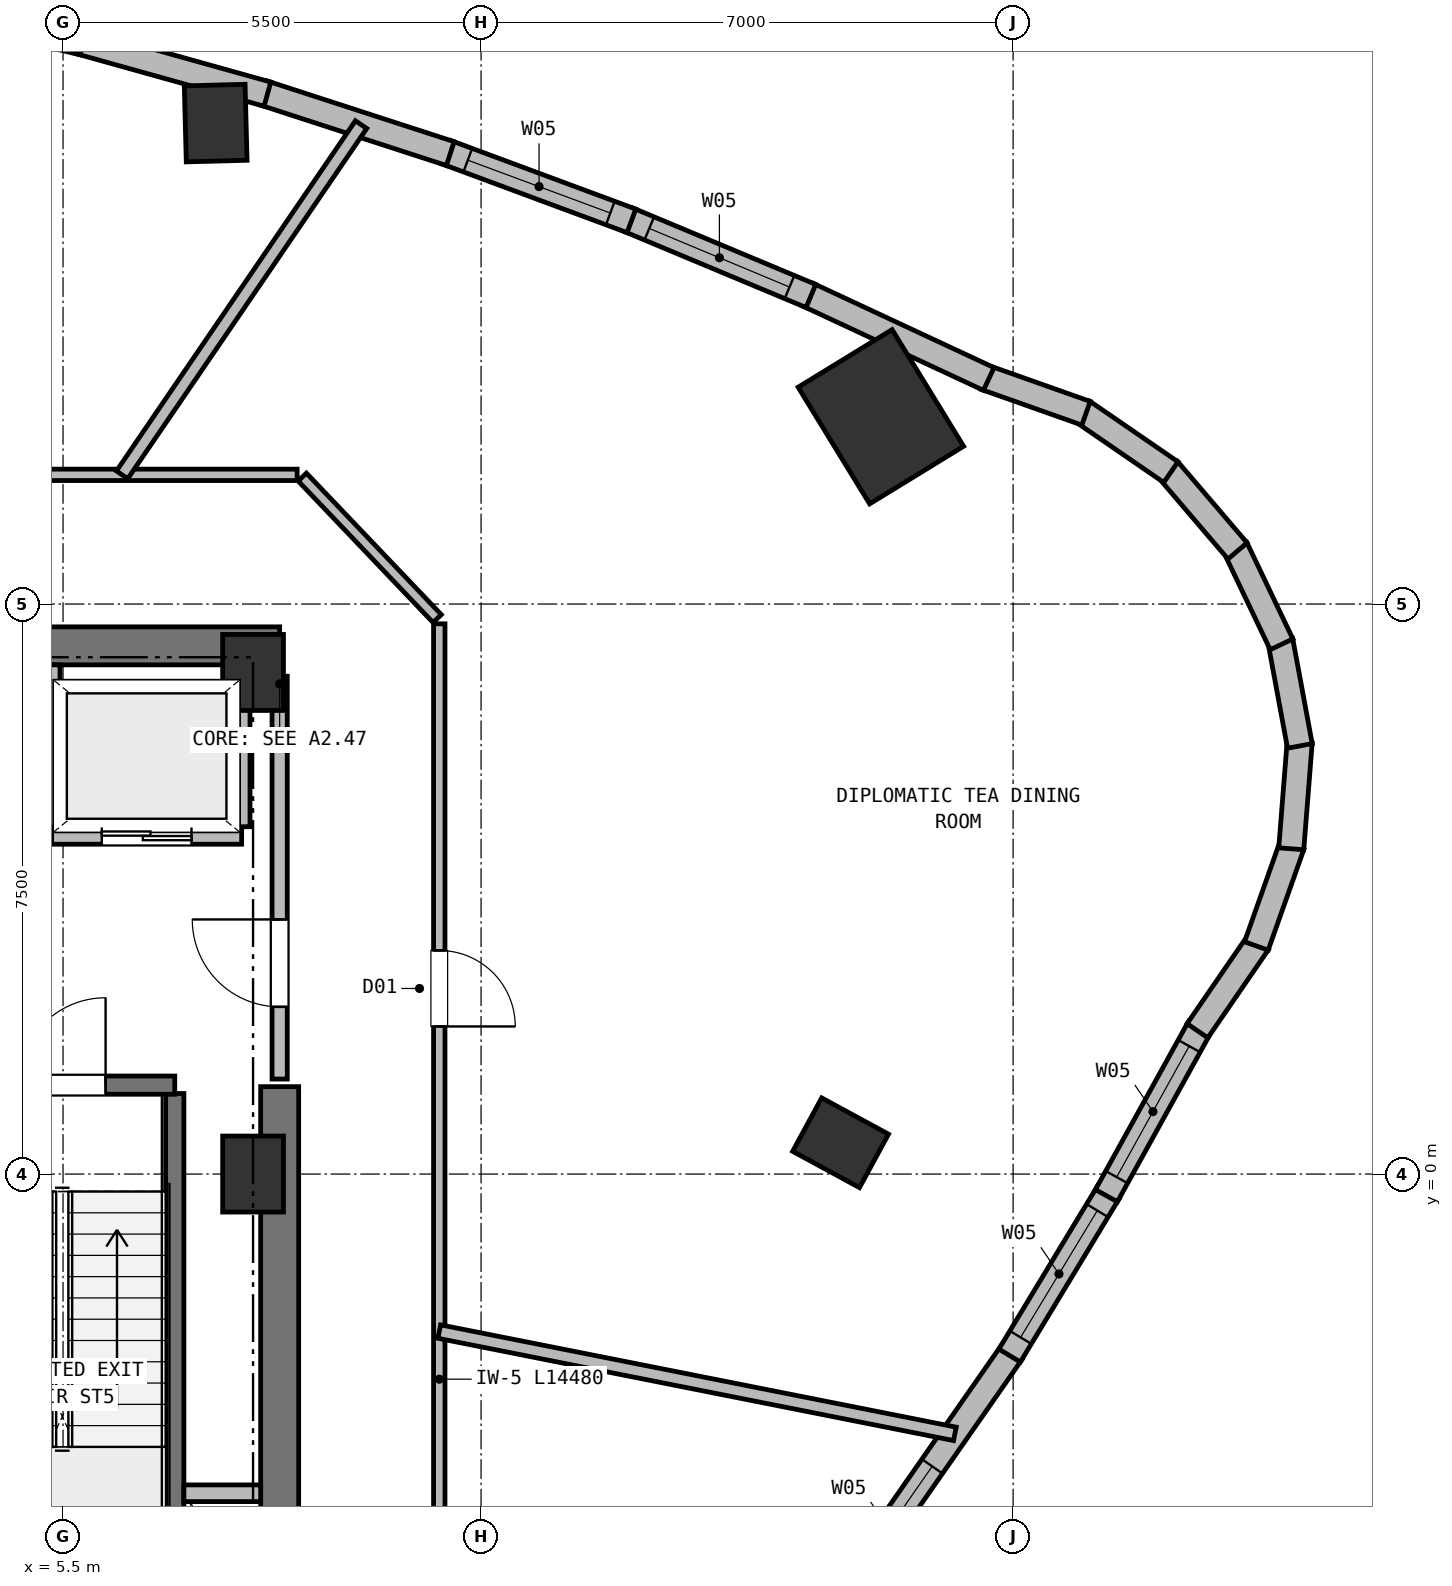
"""IFC4 building model, lengths in metres.
Left out: names, types, materials, properties, quantities, classifications, styles, units other than length and angle.
Written with IfcOpenShell. Run it as: python <this file> out.ifc"""

import sys

from ifc_helpers import new_model, si_unit, direction, frame, frame_2d, origin, origin_2d, place, context, subcontext, project, spatial, rectangle, extrude, element, fill, save


model = new_model("IFC4")
c1 = context("Model", 3, precision=1e-05, world=origin(), true_north=direction((0.0, 1.0)))
c2 = subcontext(c1, "Body", "Model", "MODEL_VIEW")
j1 = project(units=[si_unit("LENGTHUNIT", "METRE"), si_unit("PLANEANGLEUNIT", "RADIAN")], contexts=[c1])
p1 = place(None, origin())
s1 = spatial("IfcSite", under=j1, at=p1, CompositionType="ELEMENT")
p2 = place(p1, origin())
s2 = spatial("IfcBuilding", under=s1, at=p2, CompositionType="ELEMENT")
p3 = place(p2, frame((0.0, 0.0, 173.75)))
s3 = spatial("IfcBuildingStorey", under=s2, at=p3, CompositionType="ELEMENT", Elevation=173.75)
for number, where, z_axis, x_axis in (
    (1, (8.0, 0.0, 0.0), (0.0, 0.0, 1.0), (1.0, 0.0, 0.0)),
    (2, (8.0, 6.6, 0.0), (0.0, 0.0, 1.0), (1.0, 0.0, 0.0)),
):
    element("IfcColumn", number, at=place(p3, frame(where, z_axis=z_axis, x_axis=x_axis)), inside=s3, PredefinedType="COLUMN", context=c2, shape_type="SweptSolid", body=[
        extrude(rectangle(XDim=0.8, YDim=1.0, at=origin_2d()), origin(), (0.0, 0.0, 1.0), 4.5),
    ])
p4 = place(p3, frame((-8.35, 6.95, 0.0), z_axis=(0.0, 0.0, 1.0), x_axis=(1.0, 0.0, 0.0)))
e3 = element("IfcWall", 3, at=p4, inside=s3, PredefinedType="SHEAR", context=c2, shape_type="SweptSolid", body=[
    extrude(rectangle(XDim=16.7, YDim=0.5, at=frame_2d((8.35, 0.0))), origin(), (0.0, 0.0, 1.0), 4.21),
])
p5 = place(p3, frame((8.35, -6.95, 0.0), z_axis=(0.0, 0.0, 1.0), x_axis=(0.0, 1.0, 0.0)))
e4 = element("IfcWall", 4, at=p5, inside=s3, PredefinedType="SHEAR", context=c2, shape_type="SweptSolid", body=[
    extrude(rectangle(XDim=8.1, YDim=0.5, at=frame_2d((4.05, 0.0))), origin(), (0.0, 0.0, 1.0), 4.21),
])
p6 = place(p3, frame((15.73, 0.412, 0.0), z_axis=(0.0, 0.0, 1.0), x_axis=(0.47715876026, 0.878817112662, 0.0)))
e5 = element("IfcColumn", 5, at=p6, inside=s3, PredefinedType="COLUMN", context=c2, shape_type="SweptSolid", body=[
    extrude(rectangle(XDim=0.8, YDim=1.0, at=origin_2d()), origin(), (0.0, 0.0, 1.0), 4.5),
])
p7 = place(p3, frame((16.26, 9.964, 0.0), z_axis=(0.0, 0.0, 1.0), x_axis=(0.852640164354, 0.522498564716, 0.0)))
e6 = element("IfcColumn", 6, at=p7, inside=s3, PredefinedType="COLUMN", context=c2, shape_type="SweptSolid", body=[
    extrude(rectangle(XDim=1.45, YDim=1.8, at=origin_2d()), origin(), (0.0, 0.0, 1.0), 4.5),
])
p8 = place(p3, frame((7.508, 13.828, 0.0), z_axis=(0.0, 0.0, 1.0), x_axis=(0.999657324976, 0.026176948308, 0.0)))
e7 = element("IfcColumn", 7, at=p8, inside=s3, PredefinedType="COLUMN", context=c2, shape_type="SweptSolid", body=[
    extrude(rectangle(XDim=0.8, YDim=1.0, at=origin_2d()), origin(), (0.0, 0.0, 1.0), 4.5),
])
p9 = place(p3, frame((17.981, -2.346, 0.0), z_axis=(0.0, 0.0, 1.0), x_axis=(-0.571969587154, -0.820274826733, 0.0)))
e8 = element("IfcWall", 8, at=p9, inside=s3, PredefinedType="SOLIDWALL", context=c2, shape_type="SweptSolid", body=[
    extrude(rectangle(XDim=5.656, YDim=0.33, at=frame_2d((2.828, 0.0))), origin(), (0.0, 0.0, 1.0), 4.21),
])
p10 = place(p9, frame((1.828, 0.0, 0.72)))
e9 = element("IfcOpeningElement", 9, at=p10, cuts=e8, PredefinedType="OPENING", context=c2, shape_type="SweptSolid", body=[
    extrude(rectangle(XDim=2.0, YDim=2.15, at=frame_2d((1.0, 1.075))), frame((0.0, 0.175, 0.0), z_axis=(0.0, -1.0, 0.0), x_axis=(1.0, 0.0, 0.0)), (0.0, 0.0, 1.0), 0.35),
])
p11 = place(p3, frame((19.252, -0.241, 0.0), z_axis=(0.0, 0.0, 1.0), x_axis=(-0.517483977519, -0.855692896436, 0.0)))
e10 = element("IfcWall", 10, at=p11, inside=s3, PredefinedType="SOLIDWALL", context=c2, shape_type="SweptSolid", body=[
    extrude(rectangle(XDim=2.509, YDim=0.33, at=frame_2d((1.254, 0.0))), origin(), (0.0, 0.0, 1.0), 4.21),
])
p12 = place(p11, frame((0.279, 0.0, 0.72)))
e11 = element("IfcOpeningElement", 11, at=p12, cuts=e10, PredefinedType="OPENING", context=c2, shape_type="SweptSolid", body=[
    extrude(rectangle(XDim=1.95, YDim=2.15, at=frame_2d((0.975, 1.075))), frame((0.0, 0.175, 0.0), z_axis=(0.0, -1.0, 0.0), x_axis=(1.0, 0.0, 0.0)), (0.0, 0.0, 1.0), 0.35),
])
p13 = place(p3, frame((20.452, 1.928, 0.0), z_axis=(0.0, 0.0, 1.0), x_axis=(-0.484166759881, -0.874975741736, 0.0)))
e12 = element("IfcWall", 12, at=p13, inside=s3, PredefinedType="SOLIDWALL", context=c2, shape_type="SweptSolid", body=[
    extrude(rectangle(XDim=2.529, YDim=0.33, at=frame_2d((1.264, 0.0))), origin(), (0.0, 0.0, 1.0), 4.21),
])
p14 = place(p13, frame((0.28, 0.0, 0.72)))
e13 = element("IfcOpeningElement", 13, at=p14, cuts=e12, PredefinedType="OPENING", context=c2, shape_type="SweptSolid", body=[
    extrude(rectangle(XDim=1.97, YDim=2.15, at=frame_2d((0.985, 1.075))), frame((0.0, 0.175, 0.0), z_axis=(0.0, -1.0, 0.0), x_axis=(1.0, 0.0, 0.0)), (0.0, 0.0, 1.0), 0.35),
])
p15 = place(p3, frame((21.223, 3.045, 0.0), z_axis=(0.0, 0.0, 1.0), x_axis=(-0.566492015675, -0.824067227947, 0.0)))
e14 = element("IfcWall", 14, at=p15, inside=s3, PredefinedType="SOLIDWALL", context=c2, shape_type="SweptSolid", body=[
    extrude(rectangle(XDim=1.407, YDim=0.33, at=frame_2d((0.704, 0.0))), origin(), (0.0, 0.0, 1.0), 4.21),
])
p16 = place(p3, frame((21.67, 4.328, 0.0), z_axis=(0.0, 0.0, 1.0), x_axis=(-0.333709077945, -0.942676111555, 0.0)))
e15 = element("IfcWall", 15, at=p16, inside=s3, PredefinedType="SOLIDWALL", context=c2, shape_type="SweptSolid", body=[
    extrude(rectangle(XDim=1.408, YDim=0.33, at=frame_2d((0.704, 0.0))), origin(), (0.0, 0.0, 1.0), 4.21),
])
for number, where, z_axis, x_axis in (
    (16, (21.77, 5.683, 0.0), (0.0, 0.0, 1.0), (-0.079, -0.997, 0.0)),
    (17, (21.516, 7.017, 0.0), (0.0, 0.0, 1.0), (0.182, -0.983, 0.0)),
):
    element("IfcWall", number, at=place(p3, frame(where, z_axis=z_axis, x_axis=x_axis)), inside=s3, PredefinedType="SOLIDWALL", context=c2, shape_type="SweptSolid", body=[
        extrude(rectangle(XDim=1.407, YDim=0.33, at=frame_2d((0.704, 0.0))), origin(), (0.0, 0.0, 1.0), 4.21),
    ])
p17 = place(p3, frame((20.926, 8.24, 0.0), z_axis=(0.0, 0.0, 1.0), x_axis=(0.43048556818, -0.902597460438, 0.0)))
e18 = element("IfcWall", 18, at=p17, inside=s3, PredefinedType="SOLIDWALL", context=c2, shape_type="SweptSolid", body=[
    extrude(rectangle(XDim=1.408, YDim=0.33, at=frame_2d((0.704, 0.0))), origin(), (0.0, 0.0, 1.0), 4.21),
])
p18 = place(p3, frame((20.039, 9.269, 0.0), z_axis=(0.0, 0.0, 1.0), x_axis=(0.64941898982, -0.760430782952, 0.0)))
e19 = element("IfcWall", 19, at=p18, inside=s3, PredefinedType="SOLIDWALL", context=c2, shape_type="SweptSolid", body=[
    extrude(rectangle(XDim=1.407, YDim=0.33, at=frame_2d((0.704, 0.0))), origin(), (0.0, 0.0, 1.0), 4.21),
])
for number, where, z_axis, x_axis in (
    (20, (18.915, 10.033, 0.0), (0.0, 0.0, 1.0), (0.824, -0.566, 0.0)),
    (21, (17.633, 10.48, 0.0), (0.0, 0.0, 1.0), (0.943, -0.334, 0.0)),
):
    element("IfcWall", number, at=place(p3, frame(where, z_axis=z_axis, x_axis=x_axis)), inside=s3, PredefinedType="SOLIDWALL", context=c2, shape_type="SweptSolid", body=[
        extrude(rectangle(XDim=1.408, YDim=0.33, at=frame_2d((0.704, 0.0))), origin(), (0.0, 0.0, 1.0), 4.21),
    ])
p19 = place(p3, frame((15.294, 11.573, 0.0), z_axis=(0.0, 0.0, 1.0), x_axis=(0.906353689665, -0.422519809275, 0.0)))
e22 = element("IfcWall", 22, at=p19, inside=s3, PredefinedType="SOLIDWALL", context=c2, shape_type="SweptSolid", body=[
    extrude(rectangle(XDim=2.632, YDim=0.33, at=frame_2d((1.316, 0.0))), origin(), (0.0, 0.0, 1.0), 4.21),
])
p20 = place(p3, frame((12.932, 12.56, 0.0), z_axis=(0.0, 0.0, 1.0), x_axis=(0.922597431626, -0.385764149653, 0.0)))
e23 = element("IfcWall", 23, at=p20, inside=s3, PredefinedType="SOLIDWALL", context=c2, shape_type="SweptSolid", body=[
    extrude(rectangle(XDim=2.61, YDim=0.33, at=frame_2d((1.305, 0.0))), origin(), (0.0, 0.0, 1.0), 4.21),
])
p21 = place(p20, frame((0.305, 0.0, 0.72)))
e24 = element("IfcOpeningElement", 24, at=p21, cuts=e23, PredefinedType="OPENING", context=c2, shape_type="SweptSolid", body=[
    extrude(rectangle(XDim=2.0, YDim=2.15, at=frame_2d((1.0, 1.075))), frame((0.0, 0.175, 0.0), z_axis=(0.0, -1.0, 0.0), x_axis=(1.0, 0.0, 0.0)), (0.0, 0.0, 1.0), 0.35),
])
p22 = place(p3, frame((10.548, 13.444, 0.0), z_axis=(0.0, 0.0, 1.0), x_axis=(0.937535008849, -0.347890941506, 0.0)))
e25 = element("IfcWall", 25, at=p22, inside=s3, PredefinedType="SOLIDWALL", context=c2, shape_type="SweptSolid", body=[
    extrude(rectangle(XDim=2.592, YDim=0.33, at=frame_2d((1.296, 0.0))), origin(), (0.0, 0.0, 1.0), 4.21),
])
p23 = place(p22, frame((0.296, 0.0, 0.72)))
e26 = element("IfcOpeningElement", 26, at=p23, cuts=e25, PredefinedType="OPENING", context=c2, shape_type="SweptSolid", body=[
    extrude(rectangle(XDim=2.0, YDim=2.15, at=frame_2d((1.0, 1.075))), frame((0.0, 0.175, 0.0), z_axis=(0.0, -1.0, 0.0), x_axis=(1.0, 0.0, 0.0)), (0.0, 0.0, 1.0), 0.35),
])
p24 = place(p3, frame((8.141, 14.224, 0.0), z_axis=(0.0, 0.0, 1.0), x_axis=(0.951143213295, -0.308750040976, 0.0)))
e27 = element("IfcWall", 27, at=p24, inside=s3, PredefinedType="SOLIDWALL", context=c2, shape_type="SweptSolid", body=[
    extrude(rectangle(XDim=2.579, YDim=0.33, at=frame_2d((1.29, 0.0))), origin(), (0.0, 0.0, 1.0), 4.21),
])
p25 = place(p3, frame((5.713, 14.901, 0.0), z_axis=(0.0, 0.0, 1.0), x_axis=(0.963148250091, -0.268971092028, 0.0)))
e28 = element("IfcWall", 28, at=p25, inside=s3, PredefinedType="SOLIDWALL", context=c2, shape_type="SweptSolid", body=[
    extrude(rectangle(XDim=2.571, YDim=0.33, at=frame_2d((1.285, 0.0))), origin(), (0.0, 0.0, 1.0), 4.21),
])
p26 = place(p3, frame((3.264, 15.474, 0.0), z_axis=(0.0, 0.0, 1.0), x_axis=(0.973560466093, -0.228429461457, 0.0)))
e29 = element("IfcWall", 29, at=p26, inside=s3, PredefinedType="SOLIDWALL", context=c2, shape_type="SweptSolid", body=[
    extrude(rectangle(XDim=2.566, YDim=0.33, at=frame_2d((1.283, 0.0))), origin(), (0.0, 0.0, 1.0), 4.21),
])
p27 = place(p26, frame((0.283, 0.0, 0.72)))
e30 = element("IfcOpeningElement", 30, at=p27, cuts=e29, PredefinedType="OPENING", context=c2, shape_type="SweptSolid", body=[
    extrude(rectangle(XDim=2.0, YDim=2.15, at=frame_2d((1.0, 1.075))), frame((0.0, 0.175, 0.0), z_axis=(0.0, -1.0, 0.0), x_axis=(1.0, 0.0, 0.0)), (0.0, 0.0, 1.0), 0.35),
])
p28 = place(p3, frame((6.97, -6.16, 0.0), z_axis=(0.0, 0.0, 1.0), x_axis=(0.0, 1.0, 0.0)))
e31 = element("IfcWall", 31, at=p28, inside=s3, PredefinedType="SHEAR", context=c2, shape_type="SweptSolid", body=[
    extrude(rectangle(XDim=7.22, YDim=0.24, at=frame_2d((3.61, 0.0))), origin(), (0.0, 0.0, 1.0), 4.21),
])
p29 = place(p3, frame((4.01, 1.17, 0.0), z_axis=(0.0, 0.0, 1.0), x_axis=(1.0, 0.0, 0.0)))
e32 = element("IfcWall", 32, at=p29, inside=s3, PredefinedType="SHEAR", context=c2, shape_type="SweptSolid", body=[
    extrude(rectangle(XDim=2.96, YDim=0.24, at=frame_2d((1.48, 0.0))), origin(), (0.0, 0.0, 1.0), 4.21),
])
p30 = place(p29, frame((0.9, 0.0, 0.0)))
e33 = element("IfcOpeningElement", 33, at=p30, cuts=e32, PredefinedType="OPENING", context=c2, shape_type="SweptSolid", body=[
    extrude(rectangle(XDim=1.15, YDim=2.15, at=frame_2d((0.575, 1.075))), frame((0.0, 0.13, 0.0), z_axis=(0.0, -1.0, 0.0), x_axis=(1.0, 0.0, 0.0)), (0.0, 0.0, 1.0), 0.26),
])
p31 = place(p3, frame((7.09, -4.2, 0.0), z_axis=(0.0, 0.0, 1.0), x_axis=(1.0, 0.0, 0.0)))
e34 = element("IfcWall", 34, at=p31, inside=s3, PredefinedType="PARTITIONING", context=c2, shape_type="SweptSolid", body=[
    extrude(rectangle(XDim=1.01, YDim=0.22, at=frame_2d((0.505, 0.0))), origin(), (0.0, 0.0, 1.0), 4.21),
])
p32 = place(p3, frame((5.35, 4.45, 0.0), z_axis=(0.0, 0.0, 1.0), x_axis=(1.0, 0.0, 0.0)))
e35 = element("IfcWall", 35, at=p32, inside=s3, PredefinedType="PARTITIONING", context=c2, shape_type="SweptSolid", body=[
    extrude(rectangle(XDim=2.5, YDim=0.22, at=frame_2d((1.25, 0.0))), origin(), (0.0, 0.0, 1.0), 4.21),
])
p33 = place(p32, frame((0.66, 0.0, 0.0)))
e36 = element("IfcOpeningElement", 36, at=p33, cuts=e35, PredefinedType="OPENING", context=c2, shape_type="SweptSolid", body=[
    extrude(rectangle(XDim=1.18, YDim=2.15, at=frame_2d((0.59, 1.075))), frame((0.0, 0.12, 0.0), z_axis=(0.0, -1.0, 0.0), x_axis=(1.0, 0.0, 0.0)), (0.0, 0.0, 1.0), 0.24),
])
p34 = place(p3, frame((5.35, 4.57, 0.0), z_axis=(0.0, 0.0, 1.0), x_axis=(0.0, 1.0, 0.0)))
e37 = element("IfcWall", 37, at=p34, inside=s3, PredefinedType="PARTITIONING", context=c2, shape_type="SweptSolid", body=[
    extrude(rectangle(XDim=2.13, YDim=0.22, at=frame_2d((1.065, 0.0))), origin(), (0.0, 0.0, 1.0), 4.21),
])
p35 = place(p3, frame((7.85, 4.57, 0.0), z_axis=(0.0, 0.0, 1.0), x_axis=(0.0, 1.0, 0.0)))
e38 = element("IfcWall", 38, at=p35, inside=s3, PredefinedType="PARTITIONING", context=c2, shape_type="SweptSolid", body=[
    extrude(rectangle(XDim=2.13, YDim=0.22, at=frame_2d((1.065, 0.0))), origin(), (0.0, 0.0, 1.0), 3.84),
])
p36 = place(p3, frame((8.35, 1.25, 0.0), z_axis=(0.0, 0.0, 1.0), x_axis=(0.0, 1.0, 0.0)))
e39 = element("IfcWall", 39, at=p36, inside=s3, PredefinedType="PARTITIONING", context=c2, shape_type="SweptSolid", body=[
    extrude(rectangle(XDim=5.3, YDim=0.2, at=frame_2d((2.65, 0.0))), origin(), (0.0, 0.0, 1.0), 4.21),
])
p37 = place(p36, frame((0.95, 0.0, 0.0)))
e40 = element("IfcOpeningElement", 40, at=p37, cuts=e39, PredefinedType="OPENING", context=c2, shape_type="SweptSolid", body=[
    extrude(rectangle(XDim=1.15, YDim=2.15, at=frame_2d((0.575, 1.075))), frame((0.0, 0.11, 0.0), z_axis=(0.0, -1.0, 0.0), x_axis=(1.0, 0.0, 0.0)), (0.0, 0.0, 1.0), 0.22),
])
p38 = place(p3, frame((10.45, 7.24, 0.0), z_axis=(0.0, 0.0, 1.0), x_axis=(0.0, -1.0, 0.0)))
e41 = element("IfcWall", 41, at=p38, inside=s3, PredefinedType="PARTITIONING", context=c2, shape_type="SweptSolid", body=[
    extrude(rectangle(XDim=14.48, YDim=0.15, at=frame_2d((7.24, 0.0))), origin(), (0.0, 0.0, 1.0), 4.21),
])
p39 = place(p38, frame((4.298, 0.0, 0.0)))
e42 = element("IfcOpeningElement", 42, at=p39, cuts=e41, PredefinedType="OPENING", context=c2, shape_type="SweptSolid", body=[
    extrude(rectangle(XDim=1.0, YDim=2.15, at=frame_2d((0.5, 1.075))), frame((0.0, 0.085, 0.0), z_axis=(0.0, -1.0, 0.0), x_axis=(1.0, 0.0, 0.0)), (0.0, 0.0, 1.0), 0.17),
])
p40 = place(p3, frame((8.648, 9.171, 0.0), z_axis=(0.0, 0.0, 1.0), x_axis=(0.689960858356, -0.723846678473, 0.0)))
e43 = element("IfcWall", 43, at=p40, inside=s3, PredefinedType="PARTITIONING", context=c2, shape_type="SweptSolid", body=[
    extrude(rectangle(XDim=2.572, YDim=0.15, at=frame_2d((1.286, 0.0))), origin(), (0.0, 0.0, 1.0), 4.21),
])
p41 = place(p3, frame((-8.58, 9.2, 0.0), z_axis=(0.0, 0.0, 1.0), x_axis=(1.0, 0.0, 0.0)))
e44 = element("IfcWall", 44, at=p41, inside=s3, PredefinedType="PARTITIONING", context=c2, shape_type="SweptSolid", body=[
    extrude(rectangle(XDim=17.16, YDim=0.15, at=frame_2d((8.58, 0.0))), origin(), (0.0, 0.0, 1.0), 4.21),
])
p42 = place(p41, frame((8.625, 0.0, 0.0)))
e45 = element("IfcOpeningElement", 45, at=p42, cuts=e44, PredefinedType="OPENING", context=c2, shape_type="SweptSolid", body=[
    extrude(rectangle(XDim=1.0, YDim=2.15, at=frame_2d((0.5, 1.075))), frame((0.0, 0.085, 0.0), z_axis=(0.0, -1.0, 0.0), x_axis=(1.0, 0.0, 0.0)), (0.0, 0.0, 1.0), 0.17),
])
p43 = place(p3, frame((10.45, -2.073, 0.0), z_axis=(0.0, 0.0, 1.0), x_axis=(0.980886326551, -0.194581639385, 0.0)))
e46 = element("IfcWall", 46, at=p43, inside=s3, PredefinedType="PARTITIONING", context=c2, shape_type="SweptSolid", body=[
    extrude(rectangle(XDim=6.916, YDim=0.18, at=frame_2d((3.458, 0.0))), origin(), (0.0, 0.0, 1.0), 4.21),
])
p44 = place(p3, frame((6.277, 9.2, 0.0), z_axis=(0.0, 0.0, 1.0), x_axis=(0.563596172667, 0.826050454969, 0.0)))
e47 = element("IfcWall", 47, at=p44, inside=s3, PredefinedType="PARTITIONING", context=c2, shape_type="SweptSolid", body=[
    extrude(rectangle(XDim=5.579, YDim=0.18, at=frame_2d((2.789, 0.0))), origin(), (0.0, 0.0, 1.0), 4.21),
])
p45 = place(p10, origin())
e48 = element("IfcWindow", 48, at=p45, inside=s3, PartitioningType="SINGLE_PANEL", PredefinedType="WINDOW", context=c2, shape_type="SweptSolid", body=[
    extrude(rectangle(XDim=2.0, YDim=2.15, at=frame_2d((1.0, 1.075))), frame((0.0, 0.03, 0.0), z_axis=(0.0, -1.0, 0.0), x_axis=(1.0, 0.0, 0.0)), (0.0, 0.0, 1.0), 0.06),
])
fill(e9, e48)
p46 = place(p12, origin())
e49 = element("IfcWindow", 49, at=p46, inside=s3, PartitioningType="SINGLE_PANEL", PredefinedType="WINDOW", context=c2, shape_type="SweptSolid", body=[
    extrude(rectangle(XDim=1.95, YDim=2.15, at=frame_2d((0.975, 1.075))), frame((0.0, 0.03, 0.0), z_axis=(0.0, -1.0, 0.0), x_axis=(1.0, 0.0, 0.0)), (0.0, 0.0, 1.0), 0.06),
])
fill(e11, e49)
p47 = place(p14, origin())
e50 = element("IfcWindow", 50, at=p47, inside=s3, PartitioningType="SINGLE_PANEL", PredefinedType="WINDOW", context=c2, shape_type="SweptSolid", body=[
    extrude(rectangle(XDim=1.97, YDim=2.15, at=frame_2d((0.985, 1.075))), frame((0.0, 0.03, 0.0), z_axis=(0.0, -1.0, 0.0), x_axis=(1.0, 0.0, 0.0)), (0.0, 0.0, 1.0), 0.06),
])
fill(e13, e50)
p48 = place(p21, origin())
e51 = element("IfcWindow", 51, at=p48, inside=s3, PartitioningType="SINGLE_PANEL", PredefinedType="WINDOW", context=c2, shape_type="SweptSolid", body=[
    extrude(rectangle(XDim=2.0, YDim=2.15, at=frame_2d((1.0, 1.075))), frame((0.0, 0.03, 0.0), z_axis=(0.0, -1.0, 0.0), x_axis=(1.0, 0.0, 0.0)), (0.0, 0.0, 1.0), 0.06),
])
fill(e24, e51)
p49 = place(p23, origin())
e52 = element("IfcWindow", 52, at=p49, inside=s3, PartitioningType="SINGLE_PANEL", PredefinedType="WINDOW", context=c2, shape_type="SweptSolid", body=[
    extrude(rectangle(XDim=2.0, YDim=2.15, at=frame_2d((1.0, 1.075))), frame((0.0, 0.03, 0.0), z_axis=(0.0, -1.0, 0.0), x_axis=(1.0, 0.0, 0.0)), (0.0, 0.0, 1.0), 0.06),
])
fill(e26, e52)
p50 = place(p30, origin())
e53 = element("IfcDoor", 53, at=p50, inside=s3, OperationType="SINGLE_SWING_RIGHT", PredefinedType="DOOR", context=c2, shape_type="SweptSolid", body=[
    extrude(rectangle(XDim=1.15, YDim=2.15, at=frame_2d((0.575, 1.075))), frame((0.0, 0.025, 0.0), z_axis=(0.0, -1.0, 0.0), x_axis=(1.0, 0.0, 0.0)), (0.0, 0.0, 1.0), 0.05),
])
fill(e33, e53)
p51 = place(p33, origin())
e54 = element("IfcDoor", 54, at=p51, inside=s3, OperationType="DOUBLE_DOOR_SLIDING", PredefinedType="DOOR", context=c2, shape_type="SweptSolid", body=[
    extrude(rectangle(XDim=1.18, YDim=2.15, at=frame_2d((0.59, 1.075))), frame((0.0, 0.025, 0.0), z_axis=(0.0, -1.0, 0.0), x_axis=(1.0, 0.0, 0.0)), (0.0, 0.0, 1.0), 0.05),
])
fill(e36, e54)
p52 = place(p37, origin())
e55 = element("IfcDoor", 55, at=p52, inside=s3, OperationType="SINGLE_SWING_RIGHT", PredefinedType="DOOR", context=c2, shape_type="SweptSolid", body=[
    extrude(rectangle(XDim=1.15, YDim=2.15, at=frame_2d((0.575, 1.075))), frame((0.0, 0.025, 0.0), z_axis=(0.0, -1.0, 0.0), x_axis=(1.0, 0.0, 0.0)), (0.0, 0.0, 1.0), 0.05),
])
fill(e40, e55)
p53 = place(p39, origin())
e56 = element("IfcDoor", 56, at=p53, inside=s3, OperationType="SINGLE_SWING_RIGHT", PredefinedType="DOOR", context=c2, shape_type="SweptSolid", body=[
    extrude(rectangle(XDim=1.0, YDim=2.15, at=frame_2d((0.5, 1.075))), frame((0.0, 0.025, 0.0), z_axis=(0.0, -1.0, 0.0), x_axis=(1.0, 0.0, 0.0)), (0.0, 0.0, 1.0), 0.05),
])
fill(e42, e56)
save(model, sys.argv[1])
